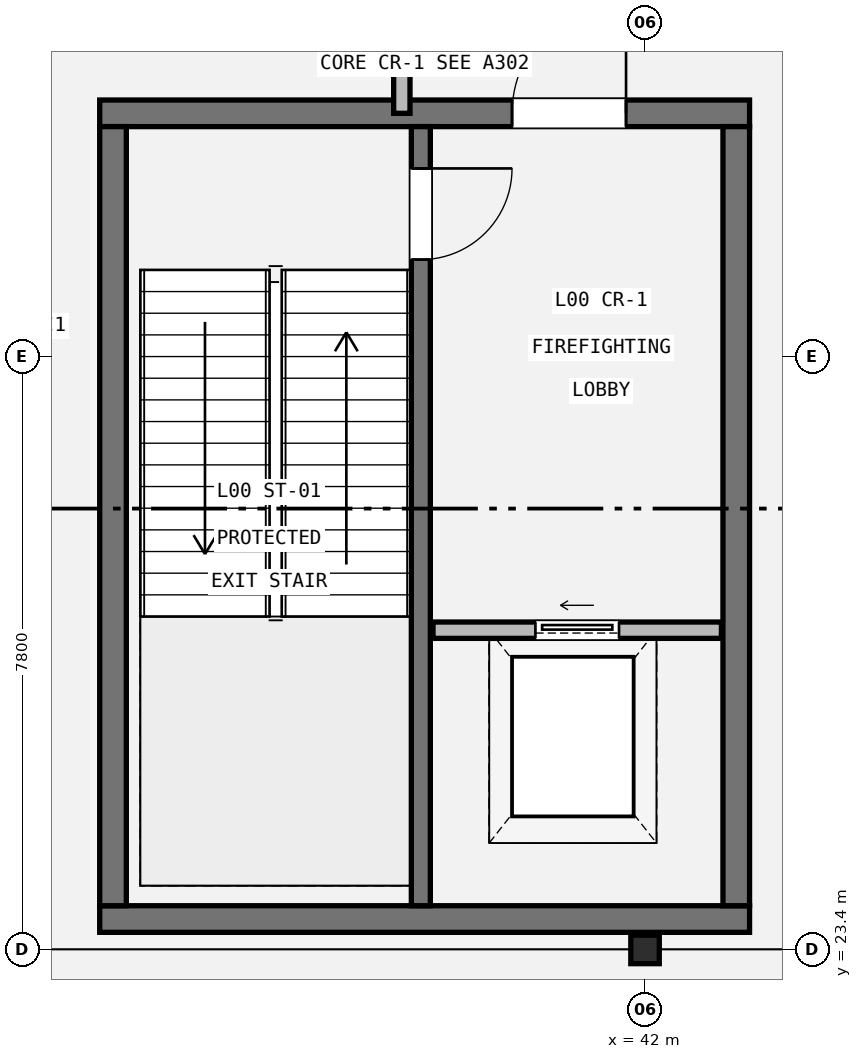
"""IFC4 building model, lengths in metres.
Left out: names, types, materials, properties, quantities, classifications, styles, units other than length and angle.
Written with IfcOpenShell. Run it as: python <this file> out.ifc"""

import sys

from ifc_helpers import new_model, si_unit, direction, frame, frame_2d, origin, origin_2d, place, context, subcontext, project, spatial, rectangle, i_section, extrude, element, fill, save


model = new_model("IFC4")
c1 = context("Model", 3, precision=1e-05, world=origin(), true_north=direction((0.0, 1.0)))
c2 = subcontext(c1, "Body", "Model", "MODEL_VIEW")
j1 = project(units=[si_unit("LENGTHUNIT", "METRE"), si_unit("PLANEANGLEUNIT", "RADIAN")], contexts=[c1])
p1 = place(None, origin())
s1 = spatial("IfcSite", under=j1, at=p1, CompositionType="ELEMENT")
p2 = place(p1, origin())
s2 = spatial("IfcBuilding", under=s1, at=p2, CompositionType="ELEMENT")
p3 = place(p2, origin())
s3 = spatial("IfcBuildingStorey", under=s2, at=p3, CompositionType="ELEMENT", Elevation=0.0)
p4 = place(p3, frame((42.0, 23.4, 0.0), z_axis=(0.0, 0.0, 1.0), x_axis=(1.0, 0.0, 0.0)))
e1 = element("IfcColumn", 1, at=p4, inside=s3, PredefinedType="COLUMN", context=c2, shape_type="SweptSolid", body=[
    extrude(i_section(OverallWidth=0.375, OverallDepth=0.375, WebThickness=0.017, FlangeThickness=0.027, FilletRadius=0.015, at=origin_2d()), origin(), (0.0, 0.0, 1.0), 5.4),
])
p5 = place(p3, frame((43.375, 23.8, 0.0), z_axis=(0.0, 0.0, 1.0), x_axis=(-1.0, 0.0, 0.0)))
e2 = element("IfcWall", 2, at=p5, inside=s3, PredefinedType="SHEAR", context=c2, shape_type="SweptSolid", body=[
    extrude(rectangle(XDim=8.55, YDim=0.35, at=frame_2d((4.275, 0.0))), origin(), (0.0, 0.0, 1.0), 5.18),
])
p6 = place(p3, frame((34.825, 34.4, 0.0), z_axis=(0.0, 0.0, 1.0), x_axis=(1.0, 0.0, 0.0)))
e3 = element("IfcWall", 3, at=p6, inside=s3, PredefinedType="SHEAR", context=c2, shape_type="SweptSolid", body=[
    extrude(rectangle(XDim=8.55, YDim=0.35, at=frame_2d((4.275, 0.0))), origin(), (0.0, 0.0, 1.0), 5.18),
])
p7 = place(p6, frame((5.425, 0.0, 0.0)))
e4 = element("IfcOpeningElement", 4, at=p7, cuts=e3, PredefinedType="OPENING", context=c2, shape_type="SweptSolid", body=[
    extrude(rectangle(XDim=1.5, YDim=2.15, at=frame_2d((0.75, 1.075))), frame((0.0, 0.185, 0.0), z_axis=(0.0, -1.0, 0.0), x_axis=(1.0, 0.0, 0.0)), (0.0, 0.0, 1.0), 0.37),
])
for number, where, z_axis, x_axis in (
    (5, (35.0, 23.975, 0.0), (0.0, 0.0, 1.0), (0.0, 1.0, 0.0)),
    (6, (43.2, 34.225, 0.0), (0.0, 0.0, 1.0), (0.0, -1.0, 0.0)),
):
    element("IfcWall", number, at=place(p3, frame(where, z_axis=z_axis, x_axis=x_axis)), inside=s3, PredefinedType="SHEAR", context=c2, shape_type="SweptSolid", body=[
        extrude(rectangle(XDim=10.25, YDim=0.35, at=frame_2d((5.125, 0.0))), origin(), (0.0, 0.0, 1.0), 5.18),
    ])
p8 = place(p3, frame((39.05, 34.225, 0.0), z_axis=(0.0, 0.0, 1.0), x_axis=(0.0, -1.0, 0.0)))
e7 = element("IfcWall", 7, at=p8, inside=s3, PredefinedType="SHEAR", context=c2, shape_type="SweptSolid", body=[
    extrude(rectangle(XDim=10.25, YDim=0.25, at=frame_2d((5.125, 0.0))), origin(), (0.0, 0.0, 1.0), 5.18),
])
p9 = place(p8, frame((0.55, 0.0, 0.0)))
e8 = element("IfcOpeningElement", 8, at=p9, cuts=e7, PredefinedType="OPENING", context=c2, shape_type="SweptSolid", body=[
    extrude(rectangle(XDim=1.2, YDim=2.15, at=frame_2d((0.6, 1.075))), frame((0.0, 0.135, 0.0), z_axis=(0.0, -1.0, 0.0), x_axis=(1.0, 0.0, 0.0)), (0.0, 0.0, 1.0), 0.27),
])
p10 = place(p3, frame((39.21, 27.6, 0.0), z_axis=(0.0, 0.0, 1.0), x_axis=(1.0, 0.0, 0.0)))
e9 = element("IfcWall", 9, at=p10, inside=s3, PredefinedType="STANDARD", context=c2, shape_type="SweptSolid", body=[
    extrude(rectangle(XDim=3.795, YDim=0.215, at=frame_2d((1.897, 0.0))), origin(), (0.0, 0.0, 1.0), 5.172),
])
p11 = place(p10, frame((1.347, 0.0, 0.0)))
e10 = element("IfcOpeningElement", 10, at=p11, cuts=e9, PredefinedType="OPENING", context=c2, shape_type="SweptSolid", body=[
    extrude(rectangle(XDim=1.1, YDim=2.2, at=frame_2d((0.55, 1.1))), frame((0.0, 0.117, 0.0), z_axis=(0.0, -1.0, 0.0), x_axis=(1.0, 0.0, 0.0)), (0.0, 0.0, 1.0), 0.235),
])
p12 = place(p3, frame((38.8, 34.4, 0.0), z_axis=(0.0, 0.0, 1.0), x_axis=(0.0, 1.0, 0.0)))
e11 = element("IfcWall", 11, at=p12, inside=s3, PredefinedType="STANDARD", context=c2, shape_type="SweptSolid", body=[
    extrude(rectangle(XDim=20.2, YDim=0.215, at=frame_2d((10.1, 0.0))), origin(), (0.0, 0.0, 1.0), 4.639),
])
p13 = place(p12, frame((8.55, 0.0, 0.0)))
e12 = element("IfcOpeningElement", 12, at=p13, cuts=e11, PredefinedType="OPENING", context=c2, shape_type="SweptSolid", body=[
    extrude(rectangle(XDim=1.2, YDim=2.15, at=frame_2d((0.6, 1.075))), frame((0.0, 0.117, 0.0), z_axis=(0.0, -1.0, 0.0), x_axis=(1.0, 0.0, 0.0)), (0.0, 0.0, 1.0), 0.235),
])
p14 = place(p9, origin())
e13 = element("IfcDoor", 13, at=p14, inside=s3, OperationType="SINGLE_SWING_LEFT", PredefinedType="DOOR", context=c2, shape_type="SweptSolid", body=[
    extrude(rectangle(XDim=1.2, YDim=2.15, at=frame_2d((0.6, 1.075))), frame((0.0, 0.025, 0.0), z_axis=(0.0, -1.0, 0.0), x_axis=(1.0, 0.0, 0.0)), (0.0, 0.0, 1.0), 0.05),
])
fill(e8, e13)
p15 = place(p7, origin())
e14 = element("IfcDoor", 14, at=p15, inside=s3, OperationType="SINGLE_SWING_RIGHT", PredefinedType="DOOR", context=c2, shape_type="SweptSolid", body=[
    extrude(rectangle(XDim=1.5, YDim=2.15, at=frame_2d((0.75, 1.075))), frame((0.0, 0.025, 0.0), z_axis=(0.0, -1.0, 0.0), x_axis=(1.0, 0.0, 0.0)), (0.0, 0.0, 1.0), 0.05),
])
fill(e4, e14)
p16 = place(p11, origin())
e15 = element("IfcDoor", 15, at=p16, inside=s3, OperationType="SLIDING_TO_LEFT", PredefinedType="DOOR", context=c2, shape_type="SweptSolid", body=[
    extrude(rectangle(XDim=1.1, YDim=2.2, at=frame_2d((0.55, 1.1))), frame((0.0, 0.025, 0.0), z_axis=(0.0, -1.0, 0.0), x_axis=(1.0, 0.0, 0.0)), (0.0, 0.0, 1.0), 0.05),
])
fill(e10, e15)
save(model, sys.argv[1])
